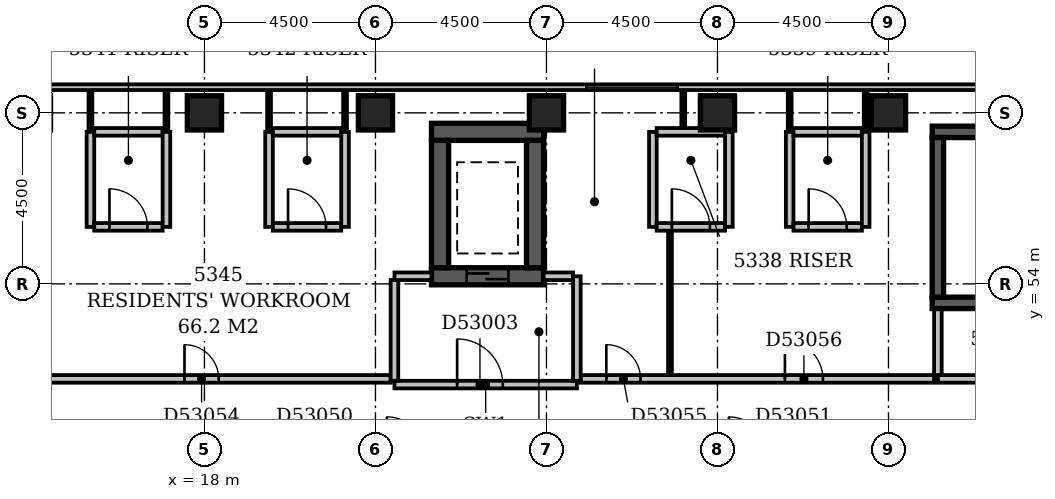
"""IFC4 building model, lengths in metres.
Left out: names, types, materials, properties, quantities, classifications, styles, units other than length and angle.
Written with IfcOpenShell. Run it as: python <this file> out.ifc"""

import sys

from ifc_helpers import new_model, si_unit, direction, frame, frame_2d, origin, origin_2d, place, context, subcontext, project, spatial, rectangle, extrude, element, fill, save


model = new_model("IFC4")
c1 = context("Model", 3, precision=1e-05, world=origin(), true_north=direction((0.0, 1.0)))
c2 = subcontext(c1, "Body", "Model", "MODEL_VIEW")
j1 = project(units=[si_unit("LENGTHUNIT", "METRE"), si_unit("PLANEANGLEUNIT", "RADIAN")], contexts=[c1])
p1 = place(None, origin())
s1 = spatial("IfcSite", under=j1, at=p1, CompositionType="ELEMENT")
p2 = place(p1, origin())
s2 = spatial("IfcBuilding", under=s1, at=p2, CompositionType="ELEMENT")
p3 = place(p2, frame((0.0, 0.0, 207.8)))
s3 = spatial("IfcBuildingStorey", under=s2, at=p3, CompositionType="ELEMENT", Elevation=207.8)
p4 = place(p3, frame((23.975, 54.2, -0.3), z_axis=(0.0, 0.0, 1.0), x_axis=(1.0, 0.0, 0.0)))
e1 = element("IfcWall", 1, at=p4, inside=s3, PredefinedType="SHEAR", context=c2, shape_type="SweptSolid", body=[
    extrude(rectangle(XDim=2.95, YDim=0.45, at=frame_2d((1.475, 0.0))), origin(), (0.0, 0.0, 1.0), 3.55),
])
p5 = place(p4, frame((0.925, 0.0, 0.3)))
e2 = element("IfcOpeningElement", 2, at=p5, cuts=e1, PredefinedType="OPENING", context=c2, shape_type="SweptSolid", body=[
    extrude(rectangle(XDim=1.1, YDim=2.1, at=frame_2d((0.55, 1.05))), frame((0.0, 0.237, 0.0), z_axis=(0.0, -1.0, 0.0), x_axis=(1.0, 0.0, 0.0)), (0.0, 0.0, 1.0), 0.474),
])
p6 = place(p3, frame((23.975, 58.0, -0.3), z_axis=(0.0, 0.0, 1.0), x_axis=(1.0, 0.0, 0.0)))
e3 = element("IfcWall", 3, at=p6, inside=s3, PredefinedType="SHEAR", context=c2, shape_type="SweptSolid", body=[
    extrude(rectangle(XDim=2.95, YDim=0.45, at=frame_2d((1.475, 0.0))), origin(), (0.0, 0.0, 1.0), 3.55),
])
for number, where, z_axis, x_axis in (
    (4, (24.2, 54.425, -0.3), (0.0, 0.0, 1.0), (0.0, 1.0, 0.0)),
    (5, (26.7, 54.425, -0.3), (0.0, 0.0, 1.0), (0.0, 1.0, 0.0)),
):
    element("IfcWall", number, at=place(p3, frame(where, z_axis=z_axis, x_axis=x_axis)), inside=s3, PredefinedType="SHEAR", context=c2, shape_type="SweptSolid", body=[
        extrude(rectangle(XDim=3.35, YDim=0.45, at=frame_2d((1.675, 0.0))), origin(), (0.0, 0.0, 1.0), 3.55),
    ])
p7 = place(p3, frame((37.15, 53.5, -0.3), z_axis=(0.0, 0.0, 1.0), x_axis=(1.0, 0.0, 0.0)))
e6 = element("IfcWall", 6, at=p7, inside=s3, PredefinedType="SHEAR", context=c2, shape_type="SweptSolid", body=[
    extrude(rectangle(XDim=7.0, YDim=0.3, at=frame_2d((3.5, 0.0))), origin(), (0.0, 0.0, 1.0), 3.55),
])
p8 = place(p7, frame((5.58, 0.0, 0.3)))
e7 = element("IfcOpeningElement", 7, at=p8, cuts=e6, PredefinedType="OPENING", context=c2, shape_type="SweptSolid", body=[
    extrude(rectangle(XDim=1.1, YDim=2.1, at=frame_2d((0.55, 1.05))), frame((0.0, 0.162, 0.0), z_axis=(0.0, -1.0, 0.0), x_axis=(1.0, 0.0, 0.0)), (0.0, 0.0, 1.0), 0.324),
])
p9 = place(p3, frame((37.15, 58.0, -0.3), z_axis=(0.0, 0.0, 1.0), x_axis=(1.0, 0.0, 0.0)))
e8 = element("IfcWall", 8, at=p9, inside=s3, PredefinedType="SHEAR", context=c2, shape_type="SweptSolid", body=[
    extrude(rectangle(XDim=7.4, YDim=0.3, at=frame_2d((3.7, 0.0))), origin(), (0.0, 0.0, 1.0), 3.55),
])
p10 = place(p3, frame((37.3, 53.65, -0.3), z_axis=(0.0, 0.0, 1.0), x_axis=(0.0, 1.0, 0.0)))
e9 = element("IfcWall", 9, at=p10, inside=s3, PredefinedType="SHEAR", context=c2, shape_type="SweptSolid", body=[
    extrude(rectangle(XDim=4.2, YDim=0.3, at=frame_2d((2.1, 0.0))), origin(), (0.0, 0.0, 1.0), 3.55),
])
for number, where, z_axis, x_axis in (
    (10, (18.0, 58.5, -0.3), (0.0, 0.0, 1.0), (1.0, 0.0, 0.0)),
    (11, (22.5, 58.5, -0.3), (0.0, 0.0, 1.0), (1.0, 0.0, 0.0)),
    (12, (27.0, 58.5, -0.3), (0.0, 0.0, 1.0), (1.0, 0.0, 0.0)),
    (13, (31.5, 58.5, -0.3), (0.0, 0.0, 1.0), (1.0, 0.0, 0.0)),
    (14, (36.0, 58.5, -0.3), (0.0, 0.0, 1.0), (1.0, 0.0, 0.0)),
):
    element("IfcColumn", number, at=place(p3, frame(where, z_axis=z_axis, x_axis=x_axis)), inside=s3, PredefinedType="COLUMN", context=c2, shape_type="SweptSolid", body=[
        extrude(rectangle(XDim=0.9, YDim=0.9, at=origin_2d()), origin(), (0.0, 0.0, 1.0), 3.55),
    ])
p11 = place(p3, frame((50.1, 59.175, 0.0), z_axis=(0.0, 0.0, 1.0), x_axis=(-1.0, 0.0, 0.0)))
e15 = element("IfcWall", 15, at=p11, inside=s3, PredefinedType="STANDARD", context=c2, shape_type="SweptSolid", body=[
    extrude(rectangle(XDim=50.85, YDim=0.15, at=frame_2d((25.425, 0.0))), origin(), (0.0, 0.0, 1.0), 2.7),
])
p12 = place(p11, frame((19.65, 0.0, 0.6)))
e16 = element("IfcOpeningElement", 16, at=p12, cuts=e15, PredefinedType="OPENING", context=c2, shape_type="SweptSolid", body=[
    extrude(rectangle(XDim=2.4, YDim=1.8, at=frame_2d((1.2, 0.9))), frame((0.0, 0.087, 0.0), z_axis=(0.0, -1.0, 0.0), x_axis=(1.0, 0.0, 0.0)), (0.0, 0.0, 1.0), 0.174),
])
p13 = place(p3, frame((23.0, 51.35, 0.0), z_axis=(0.0, 0.0, 1.0), x_axis=(1.0, 0.0, 0.0)))
e17 = element("IfcWall", 17, at=p13, inside=s3, PredefinedType="PARTITIONING", context=c2, shape_type="SweptSolid", body=[
    extrude(rectangle(XDim=4.8, YDim=0.2, at=frame_2d((2.4, 0.0))), origin(), (0.0, 0.0, 1.0), 3.25),
])
p14 = place(p13, frame((1.65, 0.0, 0.0)))
e18 = element("IfcOpeningElement", 18, at=p14, cuts=e17, PredefinedType="OPENING", context=c2, shape_type="SweptSolid", body=[
    extrude(rectangle(XDim=1.2, YDim=2.1, at=frame_2d((0.6, 1.05))), frame((0.0, 0.112, 0.0), z_axis=(0.0, -1.0, 0.0), x_axis=(1.0, 0.0, 0.0)), (0.0, 0.0, 1.0), 0.224),
])
p15 = place(p3, frame((27.8, 51.45, 0.0), z_axis=(0.0, 0.0, 1.0), x_axis=(0.0, 1.0, 0.0)))
e19 = element("IfcWall", 19, at=p15, inside=s3, PredefinedType="PARTITIONING", context=c2, shape_type="SweptSolid", body=[
    extrude(rectangle(XDim=2.75, YDim=0.2, at=frame_2d((1.375, 0.0))), origin(), (0.0, 0.0, 1.0), 3.25),
])
p16 = place(p3, frame((23.0, 54.2, 0.0), z_axis=(0.0, 0.0, 1.0), x_axis=(1.0, 0.0, 0.0)))
e20 = element("IfcWall", 20, at=p16, inside=s3, PredefinedType="PARTITIONING", context=c2, shape_type="SweptSolid", body=[
    extrude(rectangle(XDim=0.975, YDim=0.2, at=frame_2d((0.488, 0.0))), origin(), (0.0, 0.0, 1.0), 3.25),
])
p17 = place(p3, frame((26.925, 54.2, 0.0), z_axis=(0.0, 0.0, 1.0), x_axis=(1.0, 0.0, 0.0)))
e21 = element("IfcWall", 21, at=p17, inside=s3, PredefinedType="PARTITIONING", context=c2, shape_type="SweptSolid", body=[
    extrude(rectangle(XDim=0.775, YDim=0.2, at=frame_2d((0.387, 0.0))), origin(), (0.0, 0.0, 1.0), 3.25),
])
p18 = place(p3, frame((23.0, 51.45, 0.0), z_axis=(0.0, 0.0, 1.0), x_axis=(0.0, 1.0, 0.0)))
e22 = element("IfcWall", 22, at=p18, inside=s3, PredefinedType="PARTITIONING", context=c2, shape_type="SweptSolid", body=[
    extrude(rectangle(XDim=2.65, YDim=0.2, at=frame_2d((1.325, 0.0))), origin(), (0.0, 0.0, 1.0), 3.25),
])
p19 = place(p3, frame((37.3, 51.5, 0.0), z_axis=(0.0, 0.0, 1.0), x_axis=(1.0, 0.0, 0.0)))
e23 = element("IfcWall", 23, at=p19, inside=s3, PredefinedType="PARTITIONING", context=c2, shape_type="SweptSolid", body=[
    extrude(rectangle(XDim=6.7, YDim=0.2, at=frame_2d((3.35, 0.0))), origin(), (0.0, 0.0, 1.0), 3.25),
])
p20 = place(p19, frame((2.75, 0.0, 0.0)))
e24 = element("IfcOpeningElement", 24, at=p20, cuts=e23, PredefinedType="OPENING", context=c2, shape_type="SweptSolid", body=[
    extrude(rectangle(XDim=1.2, YDim=2.1, at=frame_2d((0.6, 1.05))), frame((0.0, 0.112, 0.0), z_axis=(0.0, -1.0, 0.0), x_axis=(1.0, 0.0, 0.0)), (0.0, 0.0, 1.0), 0.224),
])
p21 = place(p3, frame((37.3, 51.6, 0.0), z_axis=(0.0, 0.0, 1.0), x_axis=(0.0, 1.0, 0.0)))
e25 = element("IfcWall", 25, at=p21, inside=s3, PredefinedType="PARTITIONING", context=c2, shape_type="SweptSolid", body=[
    extrude(rectangle(XDim=1.73, YDim=0.2, at=frame_2d((0.865, 0.0))), origin(), (0.0, 0.0, 1.0), 3.25),
])
p22 = place(p3, frame((7.6, 51.5, 0.0), z_axis=(0.0, 0.0, 1.0), x_axis=(1.0, 0.0, 0.0)))
e26 = element("IfcWall", 26, at=p22, inside=s3, PredefinedType="PARTITIONING", context=c2, shape_type="SweptSolid", body=[
    extrude(rectangle(XDim=15.3, YDim=0.2, at=frame_2d((7.65, 0.0))), origin(), (0.0, 0.0, 1.0), 3.25),
])
p23 = place(p22, frame((2.075, 0.0, 0.0)))
e27 = element("IfcOpeningElement", 27, at=p23, cuts=e26, PredefinedType="OPENING", context=c2, shape_type="SweptSolid", body=[
    extrude(rectangle(XDim=1.0, YDim=2.1, at=frame_2d((0.5, 1.05))), frame((0.0, 0.112, 0.0), z_axis=(0.0, -1.0, 0.0), x_axis=(1.0, 0.0, 0.0)), (0.0, 0.0, 1.0), 0.224),
])
p24 = place(p22, frame((9.875, 0.0, 0.0)))
e28 = element("IfcOpeningElement", 28, at=p24, cuts=e26, PredefinedType="OPENING", context=c2, shape_type="SweptSolid", body=[
    extrude(rectangle(XDim=0.9, YDim=2.1, at=frame_2d((0.45, 1.05))), frame((0.0, 0.112, 0.0), z_axis=(0.0, -1.0, 0.0), x_axis=(1.0, 0.0, 0.0)), (0.0, 0.0, 1.0), 0.224),
])
p25 = place(p3, frame((27.9, 51.5, 0.0), z_axis=(0.0, 0.0, 1.0), x_axis=(1.0, 0.0, 0.0)))
e29 = element("IfcWall", 29, at=p25, inside=s3, PredefinedType="PARTITIONING", context=c2, shape_type="SweptSolid", body=[
    extrude(rectangle(XDim=9.3, YDim=0.2, at=frame_2d((4.65, 0.0))), origin(), (0.0, 0.0, 1.0), 3.25),
])
p26 = place(p25, frame((0.675, 0.0, 0.0)))
e30 = element("IfcOpeningElement", 30, at=p26, cuts=e29, PredefinedType="OPENING", context=c2, shape_type="SweptSolid", body=[
    extrude(rectangle(XDim=0.9, YDim=2.1, at=frame_2d((0.45, 1.05))), frame((0.0, 0.112, 0.0), z_axis=(0.0, -1.0, 0.0), x_axis=(1.0, 0.0, 0.0)), (0.0, 0.0, 1.0), 0.224),
])
p27 = place(p25, frame((5.375, 0.0, 0.0)))
e31 = element("IfcOpeningElement", 31, at=p27, cuts=e29, PredefinedType="OPENING", context=c2, shape_type="SweptSolid", body=[
    extrude(rectangle(XDim=1.0, YDim=2.1, at=frame_2d((0.5, 1.05))), frame((0.0, 0.112, 0.0), z_axis=(0.0, -1.0, 0.0), x_axis=(1.0, 0.0, 0.0)), (0.0, 0.0, 1.0), 0.224),
])
p28 = place(p3, frame((30.25, 51.6, 0.0), z_axis=(0.0, 0.0, 1.0), x_axis=(0.0, 1.0, 0.0)))
e32 = element("IfcWall", 32, at=p28, inside=s3, PredefinedType="PARTITIONING", context=c2, shape_type="SweptSolid", body=[
    extrude(rectangle(XDim=3.8, YDim=0.1, at=frame_2d((1.9, 0.0))), origin(), (0.0, 0.0, 1.0), 3.25),
])
p29 = place(p3, frame((15.0, 55.5, 0.0), z_axis=(0.0, 0.0, 1.0), x_axis=(0.0, 1.0, 0.0)))
e33 = element("IfcWall", 33, at=p29, inside=s3, PredefinedType="PARTITIONING", context=c2, shape_type="SweptSolid", body=[
    extrude(rectangle(XDim=2.5, YDim=0.2, at=frame_2d((1.25, 0.0))), origin(), (0.0, 0.0, 1.0), 3.25),
])
p30 = place(p3, frame((15.1, 55.5, 0.0), z_axis=(0.0, 0.0, 1.0), x_axis=(1.0, 0.0, 0.0)))
e34 = element("IfcWall", 34, at=p30, inside=s3, PredefinedType="PARTITIONING", context=c2, shape_type="SweptSolid", body=[
    extrude(rectangle(XDim=1.8, YDim=0.2, at=frame_2d((0.9, 0.0))), origin(), (0.0, 0.0, 1.0), 3.25),
])
p31 = place(p30, frame((0.4, 0.0, 0.0)))
e35 = element("IfcOpeningElement", 35, at=p31, cuts=e34, PredefinedType="OPENING", context=c2, shape_type="SweptSolid", body=[
    extrude(rectangle(XDim=1.0, YDim=2.1, at=frame_2d((0.5, 1.05))), frame((0.0, 0.112, 0.0), z_axis=(0.0, -1.0, 0.0), x_axis=(1.0, 0.0, 0.0)), (0.0, 0.0, 1.0), 0.224),
])
for number, where, z_axis, x_axis in (
    (36, (17.0, 55.5, 0.0), (0.0, 0.0, 1.0), (0.0, 1.0, 0.0)),
    (37, (19.7, 55.5, 0.0), (0.0, 0.0, 1.0), (0.0, 1.0, 0.0)),
):
    element("IfcWall", number, at=place(p3, frame(where, z_axis=z_axis, x_axis=x_axis)), inside=s3, PredefinedType="PARTITIONING", context=c2, shape_type="SweptSolid", body=[
        extrude(rectangle(XDim=2.5, YDim=0.2, at=frame_2d((1.25, 0.0))), origin(), (0.0, 0.0, 1.0), 3.25),
    ])
p32 = place(p3, frame((19.8, 55.5, 0.0), z_axis=(0.0, 0.0, 1.0), x_axis=(1.0, 0.0, 0.0)))
e38 = element("IfcWall", 38, at=p32, inside=s3, PredefinedType="PARTITIONING", context=c2, shape_type="SweptSolid", body=[
    extrude(rectangle(XDim=1.8, YDim=0.2, at=frame_2d((0.9, 0.0))), origin(), (0.0, 0.0, 1.0), 3.25),
])
p33 = place(p32, frame((0.4, 0.0, 0.0)))
e39 = element("IfcOpeningElement", 39, at=p33, cuts=e38, PredefinedType="OPENING", context=c2, shape_type="SweptSolid", body=[
    extrude(rectangle(XDim=1.0, YDim=2.1, at=frame_2d((0.5, 1.05))), frame((0.0, 0.112, 0.0), z_axis=(0.0, -1.0, 0.0), x_axis=(1.0, 0.0, 0.0)), (0.0, 0.0, 1.0), 0.224),
])
for number, where, z_axis, x_axis in (
    (40, (21.7, 55.5, 0.0), (0.0, 0.0, 1.0), (0.0, 1.0, 0.0)),
    (41, (29.8, 55.5, 0.0), (0.0, 0.0, 1.0), (0.0, 1.0, 0.0)),
):
    element("IfcWall", number, at=place(p3, frame(where, z_axis=z_axis, x_axis=x_axis)), inside=s3, PredefinedType="PARTITIONING", context=c2, shape_type="SweptSolid", body=[
        extrude(rectangle(XDim=2.5, YDim=0.2, at=frame_2d((1.25, 0.0))), origin(), (0.0, 0.0, 1.0), 3.25),
    ])
p34 = place(p3, frame((29.9, 55.5, 0.0), z_axis=(0.0, 0.0, 1.0), x_axis=(1.0, 0.0, 0.0)))
e42 = element("IfcWall", 42, at=p34, inside=s3, PredefinedType="PARTITIONING", context=c2, shape_type="SweptSolid", body=[
    extrude(rectangle(XDim=1.8, YDim=0.2, at=frame_2d((0.9, 0.0))), origin(), (0.0, 0.0, 1.0), 3.25),
])
p35 = place(p34, frame((0.4, 0.0, 0.0)))
e43 = element("IfcOpeningElement", 43, at=p35, cuts=e42, PredefinedType="OPENING", context=c2, shape_type="SweptSolid", body=[
    extrude(rectangle(XDim=1.0, YDim=2.1, at=frame_2d((0.5, 1.05))), frame((0.0, 0.112, 0.0), z_axis=(0.0, -1.0, 0.0), x_axis=(1.0, 0.0, 0.0)), (0.0, 0.0, 1.0), 0.224),
])
for number, where, z_axis, x_axis in (
    (44, (31.8, 55.5, 0.0), (0.0, 0.0, 1.0), (0.0, 1.0, 0.0)),
    (45, (33.4, 55.5, 0.0), (0.0, 0.0, 1.0), (0.0, 1.0, 0.0)),
):
    element("IfcWall", number, at=place(p3, frame(where, z_axis=z_axis, x_axis=x_axis)), inside=s3, PredefinedType="PARTITIONING", context=c2, shape_type="SweptSolid", body=[
        extrude(rectangle(XDim=2.5, YDim=0.2, at=frame_2d((1.25, 0.0))), origin(), (0.0, 0.0, 1.0), 3.25),
    ])
p36 = place(p3, frame((33.5, 55.5, 0.0), z_axis=(0.0, 0.0, 1.0), x_axis=(1.0, 0.0, 0.0)))
e46 = element("IfcWall", 46, at=p36, inside=s3, PredefinedType="PARTITIONING", context=c2, shape_type="SweptSolid", body=[
    extrude(rectangle(XDim=1.8, YDim=0.2, at=frame_2d((0.9, 0.0))), origin(), (0.0, 0.0, 1.0), 3.25),
])
p37 = place(p36, frame((0.4, 0.0, 0.0)))
e47 = element("IfcOpeningElement", 47, at=p37, cuts=e46, PredefinedType="OPENING", context=c2, shape_type="SweptSolid", body=[
    extrude(rectangle(XDim=1.0, YDim=2.1, at=frame_2d((0.5, 1.05))), frame((0.0, 0.112, 0.0), z_axis=(0.0, -1.0, 0.0), x_axis=(1.0, 0.0, 0.0)), (0.0, 0.0, 1.0), 0.224),
])
p38 = place(p3, frame((35.4, 55.5, 0.0), z_axis=(0.0, 0.0, 1.0), x_axis=(0.0, 1.0, 0.0)))
e48 = element("IfcWall", 48, at=p38, inside=s3, PredefinedType="PARTITIONING", context=c2, shape_type="SweptSolid", body=[
    extrude(rectangle(XDim=2.5, YDim=0.2, at=frame_2d((1.25, 0.0))), origin(), (0.0, 0.0, 1.0), 2.35),
])
p39 = place(p3, frame((15.0, 58.0, 0.0), z_axis=(0.0, 0.0, 1.0), x_axis=(0.0, 1.0, 0.0)))
e49 = element("IfcWall", 49, at=p39, inside=s3, PredefinedType="PARTITIONING", context=c2, shape_type="SweptSolid", body=[
    extrude(rectangle(XDim=1.1, YDim=0.1, at=frame_2d((0.55, 0.0))), origin(), (0.0, 0.0, 1.0), 3.25),
])
p40 = place(p3, frame((15.1, 58.0, 0.0), z_axis=(0.0, 0.0, 1.0), x_axis=(1.0, 0.0, 0.0)))
e50 = element("IfcWall", 50, at=p40, inside=s3, PredefinedType="PARTITIONING", context=c2, shape_type="SweptSolid", body=[
    extrude(rectangle(XDim=1.8, YDim=0.2, at=frame_2d((0.9, 0.0))), origin(), (0.0, 0.0, 1.0), 3.25),
])
for number, where, z_axis, x_axis in (
    (51, (17.0, 58.0, 0.0), (0.0, 0.0, 1.0), (0.0, 1.0, 0.0)),
    (52, (19.7, 58.0, 0.0), (0.0, 0.0, 1.0), (0.0, 1.0, 0.0)),
):
    element("IfcWall", number, at=place(p3, frame(where, z_axis=z_axis, x_axis=x_axis)), inside=s3, PredefinedType="PARTITIONING", context=c2, shape_type="SweptSolid", body=[
        extrude(rectangle(XDim=1.1, YDim=0.1, at=frame_2d((0.55, 0.0))), origin(), (0.0, 0.0, 1.0), 3.25),
    ])
p41 = place(p3, frame((19.8, 58.0, 0.0), z_axis=(0.0, 0.0, 1.0), x_axis=(1.0, 0.0, 0.0)))
e53 = element("IfcWall", 53, at=p41, inside=s3, PredefinedType="PARTITIONING", context=c2, shape_type="SweptSolid", body=[
    extrude(rectangle(XDim=1.8, YDim=0.2, at=frame_2d((0.9, 0.0))), origin(), (0.0, 0.0, 1.0), 3.25),
])
p42 = place(p3, frame((21.7, 58.0, 0.0), z_axis=(0.0, 0.0, 1.0), x_axis=(0.0, 1.0, 0.0)))
e54 = element("IfcWall", 54, at=p42, inside=s3, PredefinedType="PARTITIONING", context=c2, shape_type="SweptSolid", body=[
    extrude(rectangle(XDim=1.1, YDim=0.1, at=frame_2d((0.55, 0.0))), origin(), (0.0, 0.0, 1.0), 3.25),
])
p43 = place(p3, frame((29.9, 58.0, 0.0), z_axis=(0.0, 0.0, 1.0), x_axis=(1.0, 0.0, 0.0)))
e55 = element("IfcWall", 55, at=p43, inside=s3, PredefinedType="PARTITIONING", context=c2, shape_type="SweptSolid", body=[
    extrude(rectangle(XDim=1.8, YDim=0.2, at=frame_2d((0.9, 0.0))), origin(), (0.0, 0.0, 1.0), 3.25),
])
p44 = place(p3, frame((33.4, 58.0, 0.0), z_axis=(0.0, 0.0, 1.0), x_axis=(0.0, 1.0, 0.0)))
e56 = element("IfcWall", 56, at=p44, inside=s3, PredefinedType="PARTITIONING", context=c2, shape_type="SweptSolid", body=[
    extrude(rectangle(XDim=1.1, YDim=0.1, at=frame_2d((0.55, 0.0))), origin(), (0.0, 0.0, 1.0), 3.25),
])
p45 = place(p3, frame((33.5, 58.0, 0.0), z_axis=(0.0, 0.0, 1.0), x_axis=(1.0, 0.0, 0.0)))
e57 = element("IfcWall", 57, at=p45, inside=s3, PredefinedType="PARTITIONING", context=c2, shape_type="SweptSolid", body=[
    extrude(rectangle(XDim=1.8, YDim=0.2, at=frame_2d((0.9, 0.0))), origin(), (0.0, 0.0, 1.0), 3.25),
])
p46 = place(p3, frame((35.4, 58.0, 0.0), z_axis=(0.0, 0.0, 1.0), x_axis=(0.0, 1.0, 0.0)))
e58 = element("IfcWall", 58, at=p46, inside=s3, PredefinedType="PARTITIONING", context=c2, shape_type="SweptSolid", body=[
    extrude(rectangle(XDim=1.1, YDim=0.1, at=frame_2d((0.55, 0.0))), origin(), (0.0, 0.0, 1.0), 2.35),
])
p47 = place(p3, frame((30.6, 58.1, 0.0), z_axis=(0.0, 0.0, 1.0), x_axis=(0.0, 1.0, 0.0)))
e59 = element("IfcWall", 59, at=p47, inside=s3, PredefinedType="PARTITIONING", context=c2, shape_type="SweptSolid", body=[
    extrude(rectangle(XDim=1.0, YDim=0.1, at=frame_2d((0.5, 0.0))), origin(), (0.0, 0.0, 1.0), 3.25),
])
p48 = place(p12, origin())
e60 = element("IfcWindow", 60, at=p48, inside=s3, PartitioningType="SINGLE_PANEL", PredefinedType="WINDOW", context=c2, shape_type="SweptSolid", body=[
    extrude(rectangle(XDim=2.4, YDim=1.8, at=frame_2d((1.2, 0.9))), frame((0.0, 0.03, 0.0), z_axis=(0.0, -1.0, 0.0), x_axis=(1.0, 0.0, 0.0)), (0.0, 0.0, 1.0), 0.06),
])
fill(e16, e60)
p49 = place(p14, origin())
e61 = element("IfcDoor", 61, at=p49, inside=s3, OperationType="SINGLE_SWING_LEFT", PredefinedType="DOOR", context=c2, shape_type="SweptSolid", body=[
    extrude(rectangle(XDim=1.2, YDim=2.1, at=frame_2d((0.6, 1.05))), frame((0.0, 0.025, 0.0), z_axis=(0.0, -1.0, 0.0), x_axis=(1.0, 0.0, 0.0)), (0.0, 0.0, 1.0), 0.05),
])
fill(e18, e61)
p50 = place(p5, origin())
e62 = element("IfcDoor", 62, at=p50, inside=s3, OperationType="SLIDING_TO_LEFT", PredefinedType="DOOR", context=c2, shape_type="SweptSolid", body=[
    extrude(rectangle(XDim=1.1, YDim=2.1, at=frame_2d((0.55, 1.05))), frame((0.0, 0.025, 0.0), z_axis=(0.0, -1.0, 0.0), x_axis=(1.0, 0.0, 0.0)), (0.0, 0.0, 1.0), 0.05),
])
fill(e2, e62)
p51 = place(p24, origin())
e63 = element("IfcDoor", 63, at=p51, inside=s3, OperationType="SINGLE_SWING_LEFT", PredefinedType="DOOR", context=c2, shape_type="SweptSolid", body=[
    extrude(rectangle(XDim=0.9, YDim=2.1, at=frame_2d((0.45, 1.05))), frame((0.0, 0.025, 0.0), z_axis=(0.0, -1.0, 0.0), x_axis=(1.0, 0.0, 0.0)), (0.0, 0.0, 1.0), 0.05),
])
fill(e28, e63)
p52 = place(p26, origin())
e64 = element("IfcDoor", 64, at=p52, inside=s3, OperationType="SINGLE_SWING_LEFT", PredefinedType="DOOR", context=c2, shape_type="SweptSolid", body=[
    extrude(rectangle(XDim=0.9, YDim=2.1, at=frame_2d((0.45, 1.05))), frame((0.0, 0.025, 0.0), z_axis=(0.0, -1.0, 0.0), x_axis=(1.0, 0.0, 0.0)), (0.0, 0.0, 1.0), 0.05),
])
fill(e30, e64)
p53 = place(p27, origin())
e65 = element("IfcDoor", 65, at=p53, inside=s3, OperationType="SINGLE_SWING_LEFT", PredefinedType="DOOR", context=c2, shape_type="SweptSolid", body=[
    extrude(rectangle(XDim=1.0, YDim=2.1, at=frame_2d((0.5, 1.05))), frame((0.0, 0.025, 0.0), z_axis=(0.0, -1.0, 0.0), x_axis=(1.0, 0.0, 0.0)), (0.0, 0.0, 1.0), 0.05),
])
fill(e31, e65)
p54 = place(p31, origin())
e66 = element("IfcDoor", 66, at=p54, inside=s3, OperationType="SINGLE_SWING_LEFT", PredefinedType="DOOR", context=c2, shape_type="SweptSolid", body=[
    extrude(rectangle(XDim=1.0, YDim=2.1, at=frame_2d((0.5, 1.05))), frame((0.0, 0.025, 0.0), z_axis=(0.0, -1.0, 0.0), x_axis=(1.0, 0.0, 0.0)), (0.0, 0.0, 1.0), 0.05),
])
fill(e35, e66)
p55 = place(p33, origin())
e67 = element("IfcDoor", 67, at=p55, inside=s3, OperationType="SINGLE_SWING_LEFT", PredefinedType="DOOR", context=c2, shape_type="SweptSolid", body=[
    extrude(rectangle(XDim=1.0, YDim=2.1, at=frame_2d((0.5, 1.05))), frame((0.0, 0.025, 0.0), z_axis=(0.0, -1.0, 0.0), x_axis=(1.0, 0.0, 0.0)), (0.0, 0.0, 1.0), 0.05),
])
fill(e39, e67)
p56 = place(p35, origin())
e68 = element("IfcDoor", 68, at=p56, inside=s3, OperationType="SINGLE_SWING_LEFT", PredefinedType="DOOR", context=c2, shape_type="SweptSolid", body=[
    extrude(rectangle(XDim=1.0, YDim=2.1, at=frame_2d((0.5, 1.05))), frame((0.0, 0.025, 0.0), z_axis=(0.0, -1.0, 0.0), x_axis=(1.0, 0.0, 0.0)), (0.0, 0.0, 1.0), 0.05),
])
fill(e43, e68)
p57 = place(p37, origin())
e69 = element("IfcDoor", 69, at=p57, inside=s3, OperationType="SINGLE_SWING_LEFT", PredefinedType="DOOR", context=c2, shape_type="SweptSolid", body=[
    extrude(rectangle(XDim=1.0, YDim=2.1, at=frame_2d((0.5, 1.05))), frame((0.0, 0.025, 0.0), z_axis=(0.0, -1.0, 0.0), x_axis=(1.0, 0.0, 0.0)), (0.0, 0.0, 1.0), 0.05),
])
fill(e47, e69)
save(model, sys.argv[1])
